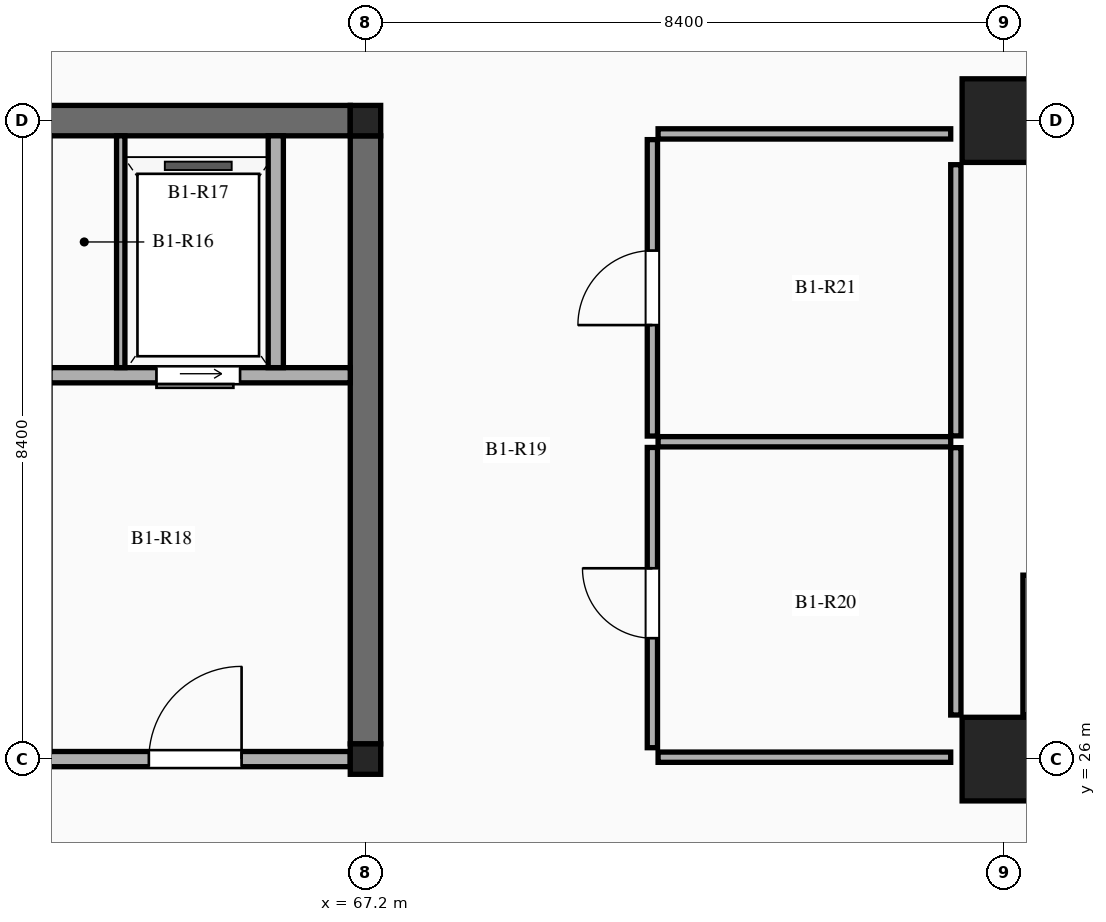
"""IFC4 building model, lengths in metres.
Left out: names, types, materials, properties, quantities, classifications, styles, units other than length and angle.
Written with IfcOpenShell. Run it as: python <this file> out.ifc"""

import sys

from ifc_helpers import new_model, si_unit, direction, frame, frame_2d, origin, origin_2d, place, context, subcontext, project, spatial, rectangle, extrude, element, fill, save


model = new_model("IFC4")
c1 = context("Model", 3, precision=1e-05, world=origin(), true_north=direction((0.0, 1.0)))
c2 = subcontext(c1, "Body", "Model", "MODEL_VIEW")
j1 = project(units=[si_unit("LENGTHUNIT", "METRE"), si_unit("PLANEANGLEUNIT", "RADIAN")], contexts=[c1])
p1 = place(None, origin())
s1 = spatial("IfcSite", under=j1, at=p1, CompositionType="ELEMENT")
p2 = place(p1, origin())
s2 = spatial("IfcBuilding", under=s1, at=p2, CompositionType="ELEMENT")
p3 = place(p2, frame((0.0, 0.0, -4.5)))
s3 = spatial("IfcBuildingStorey", under=s2, at=p3, CompositionType="ELEMENT", Elevation=-4.5)
for number, where, z_axis, x_axis in (
    (1, (67.2, 26.0, 0.0), (0.0, 0.0, 1.0), (1.0, 0.0, 0.0)),
    (2, (67.2, 34.4, 0.0), (0.0, 0.0, 1.0), (1.0, 0.0, 0.0)),
):
    element("IfcColumn", number, at=place(p3, frame(where, z_axis=z_axis, x_axis=x_axis)), inside=s3, PredefinedType="COLUMN", context=c2, shape_type="SweptSolid", body=[
        extrude(rectangle(XDim=0.4, YDim=0.4, at=origin_2d()), origin(), (0.0, 0.0, 1.0), 4.5),
    ])
for number, where, z_axis, x_axis in (
    (3, (75.6, 26.0, 0.0), (0.0, 0.0, 1.0), (1.0, 0.0, 0.0)),
    (4, (75.6, 34.4, 0.0), (0.0, 0.0, 1.0), (1.0, 0.0, 0.0)),
):
    element("IfcColumn", number, at=place(p3, frame(where, z_axis=z_axis, x_axis=x_axis)), inside=s3, PredefinedType="COLUMN", context=c2, shape_type="SweptSolid", body=[
        extrude(rectangle(XDim=1.1, YDim=1.1, at=origin_2d()), origin(), (0.0, 0.0, 1.0), 4.5),
    ])
for number, where, z_axis, x_axis in (
    (5, (67.2, 26.2, 0.0), (0.0, 0.0, 1.0), (0.0, 1.0, 0.0)),
    (6, (59.0, 34.4, 0.0), (0.0, 0.0, 1.0), (1.0, 0.0, 0.0)),
):
    element("IfcWall", number, at=place(p3, frame(where, z_axis=z_axis, x_axis=x_axis)), inside=s3, PredefinedType="SHEAR", context=c2, shape_type="SweptSolid", body=[
        extrude(rectangle(XDim=8.0, YDim=0.4, at=frame_2d((4.0, 0.0))), origin(), (0.0, 0.0, 1.0), 4.5),
    ])
p4 = place(p3, frame((59.0, 26.0, 0.0), z_axis=(0.0, 0.0, 1.0), x_axis=(1.0, 0.0, 0.0)))
e7 = element("IfcWall", 7, at=p4, inside=s3, PredefinedType="SOLIDWALL", context=c2, shape_type="SweptSolid", body=[
    extrude(rectangle(XDim=8.0, YDim=0.2, at=frame_2d((4.0, 0.0))), origin(), (0.0, 0.0, 1.0), 3.63),
])
p5 = place(p4, frame((1.55, 0.0, 0.0)))
e8 = element("IfcOpeningElement", 8, at=p5, cuts=e7, PredefinedType="OPENING", context=c2, shape_type="SweptSolid", body=[
    extrude(rectangle(XDim=1.15, YDim=2.15, at=frame_2d((0.575, 1.075))), frame((0.0, 0.11, 0.0), z_axis=(0.0, -1.0, 0.0), x_axis=(1.0, 0.0, 0.0)), (0.0, 0.0, 1.0), 0.22),
])
p6 = place(p4, frame((5.35, 0.0, 0.0)))
e9 = element("IfcOpeningElement", 9, at=p6, cuts=e7, PredefinedType="OPENING", context=c2, shape_type="SweptSolid", body=[
    extrude(rectangle(XDim=1.22, YDim=2.15, at=frame_2d((0.61, 1.075))), frame((0.0, 0.11, 0.0), z_axis=(0.0, -1.0, 0.0), x_axis=(1.0, 0.0, 0.0)), (0.0, 0.0, 1.0), 0.22),
])
p7 = place(p3, frame((63.05, 31.05, 0.0), z_axis=(0.0, 0.0, 1.0), x_axis=(1.0, 0.0, 0.0)))
e10 = element("IfcWall", 10, at=p7, inside=s3, PredefinedType="SOLIDWALL", context=c2, shape_type="SweptSolid", body=[
    extrude(rectangle(XDim=3.95, YDim=0.2, at=frame_2d((1.975, 0.0))), origin(), (0.0, 0.0, 1.0), 4.3),
])
p8 = place(p7, frame((1.4, 0.0, 0.0)))
e11 = element("IfcOpeningElement", 11, at=p8, cuts=e10, PredefinedType="OPENING", context=c2, shape_type="SweptSolid", body=[
    extrude(rectangle(XDim=1.1, YDim=2.15, at=frame_2d((0.55, 1.075))), frame((0.0, 0.11, 0.0), z_axis=(0.0, -1.0, 0.0), x_axis=(1.0, 0.0, 0.0)), (0.0, 0.0, 1.0), 0.22),
])
p9 = place(p3, frame((63.98, 31.15, 0.0), z_axis=(0.0, 0.0, 1.0), x_axis=(0.0, 1.0, 0.0)))
e12 = element("IfcWall", 12, at=p9, inside=s3, PredefinedType="PARTITIONING", context=c2, shape_type="SweptSolid", body=[
    extrude(rectangle(XDim=3.05, YDim=0.11, at=frame_2d((1.525, 0.0))), origin(), (0.0, 0.0, 1.0), 4.3),
])
p10 = place(p3, frame((66.02, 31.15, 0.0), z_axis=(0.0, 0.0, 1.0), x_axis=(0.0, 1.0, 0.0)))
e13 = element("IfcWall", 13, at=p10, inside=s3, PredefinedType="SOLIDWALL", context=c2, shape_type="SweptSolid", body=[
    extrude(rectangle(XDim=3.05, YDim=0.2, at=frame_2d((1.525, 0.0))), origin(), (0.0, 0.0, 1.0), 4.3),
])
p11 = place(p3, frame((75.95, 26.58, 0.0), z_axis=(0.0, 0.0, 1.0), x_axis=(0.0, 1.0, 0.0)))
e14 = element("IfcWall", 14, at=p11, inside=s3, PredefinedType="SOLIDWALL", context=c2, shape_type="SweptSolid", body=[
    extrude(rectangle(XDim=1.84, YDim=0.2, at=frame_2d((0.92, 0.0))), origin(), (0.0, 0.0, 1.0), 3.68),
])
p12 = place(p3, frame((70.975, 26.15, 0.0), z_axis=(0.0, 0.0, 1.0), x_axis=(0.0, 1.0, 0.0)))
e15 = element("IfcWall", 15, at=p12, inside=s3, PredefinedType="PARTITIONING", context=c2, shape_type="SweptSolid", body=[
    extrude(rectangle(XDim=3.95, YDim=0.135, at=frame_2d((1.975, 0.0))), origin(), (0.0, 0.0, 1.0), 3.45),
])
p13 = place(p12, frame((1.441, 0.0, 0.0)))
e16 = element("IfcOpeningElement", 16, at=p13, cuts=e15, PredefinedType="OPENING", context=c2, shape_type="SweptSolid", body=[
    extrude(rectangle(XDim=0.92, YDim=2.12, at=frame_2d((0.46, 1.06))), frame((0.0, 0.077, 0.0), z_axis=(0.0, -1.0, 0.0), x_axis=(1.0, 0.0, 0.0)), (0.0, 0.0, 1.0), 0.155),
])
p14 = place(p3, frame((70.975, 30.25, 0.0), z_axis=(0.0, 0.0, 1.0), x_axis=(0.0, 1.0, 0.0)))
e17 = element("IfcWall", 17, at=p14, inside=s3, PredefinedType="PARTITIONING", context=c2, shape_type="SweptSolid", body=[
    extrude(rectangle(XDim=3.9, YDim=0.135, at=frame_2d((1.95, 0.0))), origin(), (0.0, 0.0, 1.0), 3.45),
])
p15 = place(p14, frame((1.46, 0.0, 0.0)))
e18 = element("IfcOpeningElement", 18, at=p15, cuts=e17, PredefinedType="OPENING", context=c2, shape_type="SweptSolid", body=[
    extrude(rectangle(XDim=0.98, YDim=2.15, at=frame_2d((0.49, 1.075))), frame((0.0, 0.077, 0.0), z_axis=(0.0, -1.0, 0.0), x_axis=(1.0, 0.0, 0.0)), (0.0, 0.0, 1.0), 0.155),
])
for number, where, z_axis, x_axis in (
    (19, (71.05, 30.175, 0.0), (0.0, 0.0, 1.0), (1.0, 0.0, 0.0)),
    (20, (71.05, 26.025, 0.0), (0.0, 0.0, 1.0), (1.0, 0.0, 0.0)),
    (21, (71.05, 34.225, 0.0), (0.0, 0.0, 1.0), (1.0, 0.0, 0.0)),
):
    element("IfcWall", number, at=place(p3, frame(where, z_axis=z_axis, x_axis=x_axis)), inside=s3, PredefinedType="PARTITIONING", context=c2, shape_type="SweptSolid", body=[
        extrude(rectangle(XDim=3.85, YDim=0.135, at=frame_2d((1.925, 0.0))), origin(), (0.0, 0.0, 1.0), 3.45),
    ])
p16 = place(p3, frame((74.968, 26.58, 0.0), z_axis=(0.0, 0.0, 1.0), x_axis=(0.0, 1.0, 0.0)))
e22 = element("IfcWall", 22, at=p16, inside=s3, PredefinedType="PARTITIONING", context=c2, shape_type="SweptSolid", body=[
    extrude(rectangle(XDim=3.517, YDim=0.135, at=frame_2d((1.759, 0.0))), origin(), (0.0, 0.0, 1.0), 3.45),
])
p17 = place(p3, frame((74.968, 30.252, 0.0), z_axis=(0.0, 0.0, 1.0), x_axis=(0.0, 1.0, 0.0)))
e23 = element("IfcWall", 23, at=p17, inside=s3, PredefinedType="PARTITIONING", context=c2, shape_type="SweptSolid", body=[
    extrude(rectangle(XDim=3.568, YDim=0.135, at=frame_2d((1.784, 0.0))), origin(), (0.0, 0.0, 1.0), 3.45),
])
p18 = place(p6, origin())
e24 = element("IfcDoor", 24, at=p18, inside=s3, OperationType="SINGLE_SWING_RIGHT", PredefinedType="DOOR", context=c2, shape_type="SweptSolid", body=[
    extrude(rectangle(XDim=1.22, YDim=2.15, at=frame_2d((0.61, 1.075))), frame((0.0, 0.025, 0.0), z_axis=(0.0, -1.0, 0.0), x_axis=(1.0, 0.0, 0.0)), (0.0, 0.0, 1.0), 0.05),
])
fill(e9, e24)
p19 = place(p8, frame((1.1, 0.0, 0.0), z_axis=(0.0, 0.0, 1.0), x_axis=(-1.0, 0.0, 0.0)))
e25 = element("IfcDoor", 25, at=p19, inside=s3, OperationType="SLIDING_TO_LEFT", PredefinedType="DOOR", context=c2, shape_type="SweptSolid", body=[
    extrude(rectangle(XDim=1.1, YDim=2.15, at=frame_2d((0.55, 1.075))), frame((0.0, 0.025, 0.0), z_axis=(0.0, -1.0, 0.0), x_axis=(1.0, 0.0, 0.0)), (0.0, 0.0, 1.0), 0.05),
])
fill(e11, e25)
p20 = place(p13, origin())
e26 = element("IfcDoor", 26, at=p20, inside=s3, OperationType="SINGLE_SWING_RIGHT", PredefinedType="DOOR", context=c2, shape_type="SweptSolid", body=[
    extrude(rectangle(XDim=0.92, YDim=2.12, at=frame_2d((0.46, 1.06))), frame((0.0, 0.025, 0.0), z_axis=(0.0, -1.0, 0.0), x_axis=(1.0, 0.0, 0.0)), (0.0, 0.0, 1.0), 0.05),
])
fill(e16, e26)
p21 = place(p15, origin())
e27 = element("IfcDoor", 27, at=p21, inside=s3, OperationType="SINGLE_SWING_LEFT", PredefinedType="DOOR", context=c2, shape_type="SweptSolid", body=[
    extrude(rectangle(XDim=0.98, YDim=2.15, at=frame_2d((0.49, 1.075))), frame((0.0, 0.025, 0.0), z_axis=(0.0, -1.0, 0.0), x_axis=(1.0, 0.0, 0.0)), (0.0, 0.0, 1.0), 0.05),
])
fill(e18, e27)
save(model, sys.argv[1])
